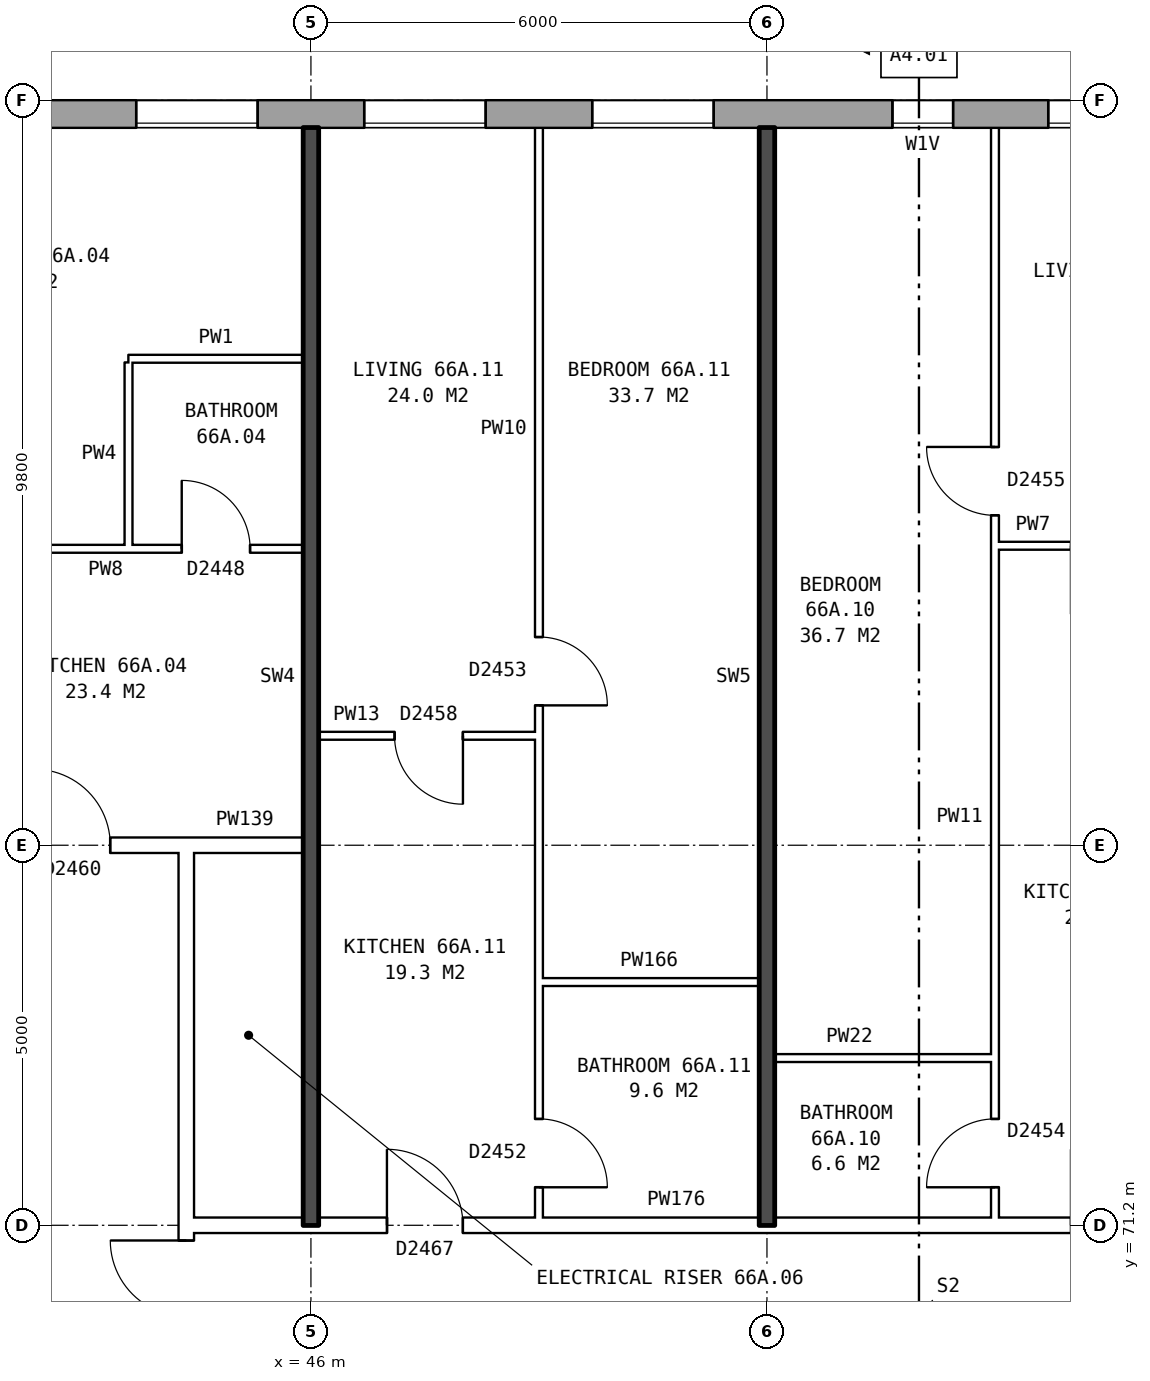
"""IFC4 building model, lengths in metres.
Left out: names, types, materials, properties, quantities, classifications, styles, units other than length and angle.
Written with IfcOpenShell. Run it as: python <this file> out.ifc"""

import sys

from ifc_helpers import new_model, si_unit, direction, frame, frame_2d, origin, place, context, subcontext, project, spatial, rectangle, extrude, element, fill, save


model = new_model("IFC4")
c1 = context("Model", 3, precision=1e-05, world=origin(), true_north=direction((0.0, 1.0)))
c2 = subcontext(c1, "Body", "Model", "MODEL_VIEW")
j1 = project(units=[si_unit("LENGTHUNIT", "METRE"), si_unit("PLANEANGLEUNIT", "RADIAN")], contexts=[c1])
p1 = place(None, origin())
s1 = spatial("IfcSite", under=j1, at=p1, CompositionType="ELEMENT")
p2 = place(p1, origin())
s2 = spatial("IfcBuilding", under=s1, at=p2, CompositionType="ELEMENT")
p3 = place(p2, frame((0.0, 0.0, 233.8)))
s3 = spatial("IfcBuildingStorey", under=s2, at=p3, CompositionType="ELEMENT", Elevation=233.8)
p4 = place(p3, frame((74.95, 85.82, 0.0), z_axis=(0.0, 0.0, 1.0), x_axis=(-1.0, 0.0, 0.0)))
e1 = element("IfcWall", 1, at=p4, inside=s3, PredefinedType="STANDARD", context=c2, shape_type="SweptSolid", body=[
    extrude(rectangle(XDim=39.875, YDim=0.36, at=frame_2d((19.938, 0.0))), origin(), (0.0, 0.0, 1.0), 2.85),
])
p5 = place(p4, frame((2.65, 0.0, 0.8)))
e2 = element("IfcOpeningElement", 2, at=p5, cuts=e1, PredefinedType="OPENING", context=c2, shape_type="SweptSolid", body=[
    extrude(rectangle(XDim=1.6, YDim=1.8, at=frame_2d((0.8, 0.9))), frame((0.0, 0.19, 0.0), z_axis=(0.0, -1.0, 0.0), x_axis=(1.0, 0.0, 0.0)), (0.0, 0.0, 1.0), 0.38),
])
p6 = place(p4, frame((5.65, 0.0, 0.8)))
e3 = element("IfcOpeningElement", 3, at=p6, cuts=e1, PredefinedType="OPENING", context=c2, shape_type="SweptSolid", body=[
    extrude(rectangle(XDim=1.6, YDim=1.8, at=frame_2d((0.8, 0.9))), frame((0.0, 0.19, 0.0), z_axis=(0.0, -1.0, 0.0), x_axis=(1.0, 0.0, 0.0)), (0.0, 0.0, 1.0), 0.38),
])
p7 = place(p4, frame((8.65, 0.0, 0.8)))
e4 = element("IfcOpeningElement", 4, at=p7, cuts=e1, PredefinedType="OPENING", context=c2, shape_type="SweptSolid", body=[
    extrude(rectangle(XDim=1.6, YDim=1.8, at=frame_2d((0.8, 0.9))), frame((0.0, 0.19, 0.0), z_axis=(0.0, -1.0, 0.0), x_axis=(1.0, 0.0, 0.0)), (0.0, 0.0, 1.0), 0.38),
])
p8 = place(p4, frame((11.65, 0.0, 0.8)))
e5 = element("IfcOpeningElement", 5, at=p8, cuts=e1, PredefinedType="OPENING", context=c2, shape_type="SweptSolid", body=[
    extrude(rectangle(XDim=1.6, YDim=1.8, at=frame_2d((0.8, 0.9))), frame((0.0, 0.19, 0.0), z_axis=(0.0, -1.0, 0.0), x_axis=(1.0, 0.0, 0.0)), (0.0, 0.0, 1.0), 0.38),
])
p9 = place(p4, frame((14.65, 0.0, 0.8)))
e6 = element("IfcOpeningElement", 6, at=p9, cuts=e1, PredefinedType="OPENING", context=c2, shape_type="SweptSolid", body=[
    extrude(rectangle(XDim=1.6, YDim=1.8, at=frame_2d((0.8, 0.9))), frame((0.0, 0.19, 0.0), z_axis=(0.0, -1.0, 0.0), x_axis=(1.0, 0.0, 0.0)), (0.0, 0.0, 1.0), 0.38),
])
p10 = place(p4, frame((17.65, 0.0, 0.8)))
e7 = element("IfcOpeningElement", 7, at=p10, cuts=e1, PredefinedType="OPENING", context=c2, shape_type="SweptSolid", body=[
    extrude(rectangle(XDim=1.6, YDim=1.8, at=frame_2d((0.8, 0.9))), frame((0.0, 0.19, 0.0), z_axis=(0.0, -1.0, 0.0), x_axis=(1.0, 0.0, 0.0)), (0.0, 0.0, 1.0), 0.38),
])
p11 = place(p4, frame((20.5, 0.0, 0.15)))
e8 = element("IfcOpeningElement", 8, at=p11, cuts=e1, PredefinedType="OPENING", context=c2, shape_type="SweptSolid", body=[
    extrude(rectangle(XDim=0.8, YDim=0.9, at=frame_2d((0.4, 0.45))), frame((0.0, 0.19, 0.0), z_axis=(0.0, -1.0, 0.0), x_axis=(1.0, 0.0, 0.0)), (0.0, 0.0, 1.0), 0.38),
])
p12 = place(p4, frame((23.65, 0.0, 0.8)))
e9 = element("IfcOpeningElement", 9, at=p12, cuts=e1, PredefinedType="OPENING", context=c2, shape_type="SweptSolid", body=[
    extrude(rectangle(XDim=1.6, YDim=1.8, at=frame_2d((0.8, 0.9))), frame((0.0, 0.19, 0.0), z_axis=(0.0, -1.0, 0.0), x_axis=(1.0, 0.0, 0.0)), (0.0, 0.0, 1.0), 0.38),
])
p13 = place(p4, frame((26.65, 0.0, 0.8)))
e10 = element("IfcOpeningElement", 10, at=p13, cuts=e1, PredefinedType="OPENING", context=c2, shape_type="SweptSolid", body=[
    extrude(rectangle(XDim=1.6, YDim=1.8, at=frame_2d((0.8, 0.9))), frame((0.0, 0.19, 0.0), z_axis=(0.0, -1.0, 0.0), x_axis=(1.0, 0.0, 0.0)), (0.0, 0.0, 1.0), 0.38),
])
p14 = place(p4, frame((29.65, 0.0, 0.8)))
e11 = element("IfcOpeningElement", 11, at=p14, cuts=e1, PredefinedType="OPENING", context=c2, shape_type="SweptSolid", body=[
    extrude(rectangle(XDim=1.6, YDim=1.8, at=frame_2d((0.8, 0.9))), frame((0.0, 0.19, 0.0), z_axis=(0.0, -1.0, 0.0), x_axis=(1.0, 0.0, 0.0)), (0.0, 0.0, 1.0), 0.38),
])
p15 = place(p4, frame((32.65, 0.0, 0.8)))
e12 = element("IfcOpeningElement", 12, at=p15, cuts=e1, PredefinedType="OPENING", context=c2, shape_type="SweptSolid", body=[
    extrude(rectangle(XDim=1.6, YDim=1.8, at=frame_2d((0.8, 0.9))), frame((0.0, 0.19, 0.0), z_axis=(0.0, -1.0, 0.0), x_axis=(1.0, 0.0, 0.0)), (0.0, 0.0, 1.0), 0.38),
])
p16 = place(p4, frame((35.65, 0.0, 0.8)))
e13 = element("IfcOpeningElement", 13, at=p16, cuts=e1, PredefinedType="OPENING", context=c2, shape_type="SweptSolid", body=[
    extrude(rectangle(XDim=1.6, YDim=1.8, at=frame_2d((0.8, 0.9))), frame((0.0, 0.19, 0.0), z_axis=(0.0, -1.0, 0.0), x_axis=(1.0, 0.0, 0.0)), (0.0, 0.0, 1.0), 0.38),
])
p17 = place(p3, frame((44.36, 63.9, 0.0), z_axis=(0.0, 0.0, 1.0), x_axis=(0.0, 1.0, 0.0)))
e14 = element("IfcWall", 14, at=p17, inside=s3, PredefinedType="PARTITIONING", context=c2, shape_type="SweptSolid", body=[
    extrude(rectangle(XDim=12.2, YDim=0.2, at=frame_2d((6.1, 0.0))), origin(), (0.0, 0.0, 1.0), 2.85),
])
p18 = place(p17, frame((5.1, 0.0, 0.0)))
e15 = element("IfcOpeningElement", 15, at=p18, cuts=e14, PredefinedType="OPENING", context=c2, shape_type="SweptSolid", body=[
    extrude(rectangle(XDim=2.0, YDim=2.1, at=frame_2d((1.0, 1.05))), frame((0.0, 0.11, 0.0), z_axis=(0.0, -1.0, 0.0), x_axis=(1.0, 0.0, 0.0)), (0.0, 0.0, 1.0), 0.22),
])
p19 = place(p3, frame((44.36, 71.2, 0.0), z_axis=(0.0, 0.0, 1.0), x_axis=(1.0, 0.0, 0.0)))
e16 = element("IfcWall", 16, at=p19, inside=s3, PredefinedType="PARTITIONING", context=c2, shape_type="SweptSolid", body=[
    extrude(rectangle(XDim=19.28, YDim=0.2, at=frame_2d((9.64, 0.0))), origin(), (0.0, 0.0, 1.0), 2.85),
])
p20 = place(p19, frame((14.64, 0.0, 0.0)))
e17 = element("IfcOpeningElement", 17, at=p20, cuts=e16, PredefinedType="OPENING", context=c2, shape_type="SweptSolid", body=[
    extrude(rectangle(XDim=1.0, YDim=2.1, at=frame_2d((0.5, 1.05))), frame((0.0, 0.11, 0.0), z_axis=(0.0, -1.0, 0.0), x_axis=(1.0, 0.0, 0.0)), (0.0, 0.0, 1.0), 0.22),
])
p21 = place(p19, frame((11.64, 0.0, 0.0)))
e18 = element("IfcOpeningElement", 18, at=p21, cuts=e16, PredefinedType="OPENING", context=c2, shape_type="SweptSolid", body=[
    extrude(rectangle(XDim=1.0, YDim=2.1, at=frame_2d((0.5, 1.05))), frame((0.0, 0.11, 0.0), z_axis=(0.0, -1.0, 0.0), x_axis=(1.0, 0.0, 0.0)), (0.0, 0.0, 1.0), 0.22),
])
p22 = place(p19, frame((2.64, 0.0, 0.0)))
e19 = element("IfcOpeningElement", 19, at=p22, cuts=e16, PredefinedType="OPENING", context=c2, shape_type="SweptSolid", body=[
    extrude(rectangle(XDim=1.0, YDim=2.1, at=frame_2d((0.5, 1.05))), frame((0.0, 0.11, 0.0), z_axis=(0.0, -1.0, 0.0), x_axis=(1.0, 0.0, 0.0)), (0.0, 0.0, 1.0), 0.22),
])
for number, where, z_axis, x_axis in (
    (20, (52.1, 73.4, 0.0), (0.0, 0.0, 1.0), (1.0, 0.0, 0.0)),
    (21, (49.0, 74.4, 0.0), (0.0, 0.0, 1.0), (1.0, 0.0, 0.0)),
):
    element("IfcWall", number, at=place(p3, frame(where, z_axis=z_axis, x_axis=x_axis)), inside=s3, PredefinedType="PARTITIONING", context=c2, shape_type="SweptSolid", body=[
        extrude(rectangle(XDim=2.9, YDim=0.1, at=frame_2d((1.45, 0.0))), origin(), (0.0, 0.0, 1.0), 2.85),
    ])
p23 = place(p3, frame((41.36, 76.2, 0.0), z_axis=(0.0, 0.0, 1.0), x_axis=(1.0, 0.0, 0.0)))
e22 = element("IfcWall", 22, at=p23, inside=s3, PredefinedType="PARTITIONING", context=c2, shape_type="SweptSolid", body=[
    extrude(rectangle(XDim=3.0, YDim=0.2, at=frame_2d((1.5, 0.0))), origin(), (0.0, 0.0, 1.0), 2.85),
])
p24 = place(p23, frame((1.0, 0.0, 0.0)))
e23 = element("IfcOpeningElement", 23, at=p24, cuts=e22, PredefinedType="OPENING", context=c2, shape_type="SweptSolid", body=[
    extrude(rectangle(XDim=1.0, YDim=2.1, at=frame_2d((0.5, 1.05))), frame((0.0, 0.11, 0.0), z_axis=(0.0, -1.0, 0.0), x_axis=(1.0, 0.0, 0.0)), (0.0, 0.0, 1.0), 0.22),
])
p25 = place(p3, frame((44.36, 76.2, 0.0), z_axis=(0.0, 0.0, 1.0), x_axis=(1.0, 0.0, 0.0)))
e24 = element("IfcWall", 24, at=p25, inside=s3, PredefinedType="PARTITIONING", context=c2, shape_type="SweptSolid", body=[
    extrude(rectangle(XDim=1.54, YDim=0.2, at=frame_2d((0.77, 0.0))), origin(), (0.0, 0.0, 1.0), 2.85),
])
p26 = place(p3, frame((46.1, 77.64, 0.0), z_axis=(0.0, 0.0, 1.0), x_axis=(1.0, 0.0, 0.0)))
e25 = element("IfcWall", 25, at=p26, inside=s3, PredefinedType="PARTITIONING", context=c2, shape_type="SweptSolid", body=[
    extrude(rectangle(XDim=2.9, YDim=0.1, at=frame_2d((1.45, 0.0))), origin(), (0.0, 0.0, 1.0), 2.85),
])
p27 = place(p26, frame((1.0, 0.0, 0.0)))
e26 = element("IfcOpeningElement", 26, at=p27, cuts=e25, PredefinedType="OPENING", context=c2, shape_type="SweptSolid", body=[
    extrude(rectangle(XDim=0.9, YDim=2.1, at=frame_2d((0.45, 1.05))), frame((0.0, 0.06, 0.0), z_axis=(0.0, -1.0, 0.0), x_axis=(1.0, 0.0, 0.0)), (0.0, 0.0, 1.0), 0.12),
])
p28 = place(p3, frame((40.1, 80.1, 0.0), z_axis=(0.0, 0.0, 1.0), x_axis=(1.0, 0.0, 0.0)))
e27 = element("IfcWall", 27, at=p28, inside=s3, PredefinedType="PARTITIONING", context=c2, shape_type="SweptSolid", body=[
    extrude(rectangle(XDim=5.8, YDim=0.1, at=frame_2d((2.9, 0.0))), origin(), (0.0, 0.0, 1.0), 2.85),
])
p29 = place(p28, frame((1.3, 0.0, 0.0)))
e28 = element("IfcOpeningElement", 28, at=p29, cuts=e27, PredefinedType="OPENING", context=c2, shape_type="SweptSolid", body=[
    extrude(rectangle(XDim=0.9, YDim=2.1, at=frame_2d((0.45, 1.05))), frame((0.0, 0.06, 0.0), z_axis=(0.0, -1.0, 0.0), x_axis=(1.0, 0.0, 0.0)), (0.0, 0.0, 1.0), 0.12),
])
p30 = place(p28, frame((4.2, 0.0, 0.0)))
e29 = element("IfcOpeningElement", 29, at=p30, cuts=e27, PredefinedType="OPENING", context=c2, shape_type="SweptSolid", body=[
    extrude(rectangle(XDim=0.9, YDim=2.1, at=frame_2d((0.45, 1.05))), frame((0.0, 0.06, 0.0), z_axis=(0.0, -1.0, 0.0), x_axis=(1.0, 0.0, 0.0)), (0.0, 0.0, 1.0), 0.12),
])
p31 = place(p3, frame((55.0, 80.14, 0.0), z_axis=(0.0, 0.0, 1.0), x_axis=(1.0, 0.0, 0.0)))
e30 = element("IfcWall", 30, at=p31, inside=s3, PredefinedType="PARTITIONING", context=c2, shape_type="SweptSolid", body=[
    extrude(rectangle(XDim=2.9, YDim=0.1, at=frame_2d((1.45, 0.0))), origin(), (0.0, 0.0, 1.0), 2.85),
])
p32 = place(p31, frame((1.0, 0.0, 0.0)))
e31 = element("IfcOpeningElement", 31, at=p32, cuts=e30, PredefinedType="OPENING", context=c2, shape_type="SweptSolid", body=[
    extrude(rectangle(XDim=0.9, YDim=2.1, at=frame_2d((0.45, 1.05))), frame((0.0, 0.06, 0.0), z_axis=(0.0, -1.0, 0.0), x_axis=(1.0, 0.0, 0.0)), (0.0, 0.0, 1.0), 0.12),
])
p33 = place(p3, frame((43.6, 82.6, 0.0), z_axis=(0.0, 0.0, 1.0), x_axis=(1.0, 0.0, 0.0)))
e32 = element("IfcWall", 32, at=p33, inside=s3, PredefinedType="PARTITIONING", context=c2, shape_type="SweptSolid", body=[
    extrude(rectangle(XDim=2.3, YDim=0.1, at=frame_2d((1.15, 0.0))), origin(), (0.0, 0.0, 1.0), 2.85),
])
p34 = place(p3, frame((43.6, 80.15, 0.0), z_axis=(0.0, 0.0, 1.0), x_axis=(0.0, 1.0, 0.0)))
e33 = element("IfcWall", 33, at=p34, inside=s3, PredefinedType="PARTITIONING", context=c2, shape_type="SweptSolid", body=[
    extrude(rectangle(XDim=2.4, YDim=0.1, at=frame_2d((1.2, 0.0))), origin(), (0.0, 0.0, 1.0), 2.85),
])
p35 = place(p3, frame((46.0, 71.2, 0.0), z_axis=(0.0, 0.0, 1.0), x_axis=(0.0, 1.0, 0.0)))
e34 = element("IfcWall", 34, at=p35, inside=s3, PredefinedType="SOLIDWALL", context=c2, shape_type="SweptSolid", body=[
    extrude(rectangle(XDim=14.44, YDim=0.2, at=frame_2d((7.22, 0.0))), origin(), (0.0, 0.0, 1.0), 2.85),
])
p36 = place(p3, frame((49.0, 71.3, 0.0), z_axis=(0.0, 0.0, 1.0), x_axis=(0.0, 1.0, 0.0)))
e35 = element("IfcWall", 35, at=p36, inside=s3, PredefinedType="PARTITIONING", context=c2, shape_type="SweptSolid", body=[
    extrude(rectangle(XDim=14.34, YDim=0.1, at=frame_2d((7.17, 0.0))), origin(), (0.0, 0.0, 1.0), 2.85),
])
p37 = place(p36, frame((6.74, 0.0, 0.0)))
e36 = element("IfcOpeningElement", 36, at=p37, cuts=e35, PredefinedType="OPENING", context=c2, shape_type="SweptSolid", body=[
    extrude(rectangle(XDim=0.9, YDim=2.1, at=frame_2d((0.45, 1.05))), frame((0.0, 0.06, 0.0), z_axis=(0.0, -1.0, 0.0), x_axis=(1.0, 0.0, 0.0)), (0.0, 0.0, 1.0), 0.12),
])
p38 = place(p36, frame((0.4, 0.0, 0.0)))
e37 = element("IfcOpeningElement", 37, at=p38, cuts=e35, PredefinedType="OPENING", context=c2, shape_type="SweptSolid", body=[
    extrude(rectangle(XDim=0.9, YDim=2.1, at=frame_2d((0.45, 1.05))), frame((0.0, 0.06, 0.0), z_axis=(0.0, -1.0, 0.0), x_axis=(1.0, 0.0, 0.0)), (0.0, 0.0, 1.0), 0.12),
])
p39 = place(p3, frame((52.0, 71.2, 0.0), z_axis=(0.0, 0.0, 1.0), x_axis=(0.0, 1.0, 0.0)))
e38 = element("IfcWall", 38, at=p39, inside=s3, PredefinedType="SOLIDWALL", context=c2, shape_type="SweptSolid", body=[
    extrude(rectangle(XDim=14.44, YDim=0.2, at=frame_2d((7.22, 0.0))), origin(), (0.0, 0.0, 1.0), 2.85),
])
p40 = place(p3, frame((55.0, 71.3, 0.0), z_axis=(0.0, 0.0, 1.0), x_axis=(0.0, 1.0, 0.0)))
e39 = element("IfcWall", 39, at=p40, inside=s3, PredefinedType="PARTITIONING", context=c2, shape_type="SweptSolid", body=[
    extrude(rectangle(XDim=14.34, YDim=0.1, at=frame_2d((7.17, 0.0))), origin(), (0.0, 0.0, 1.0), 2.85),
])
p41 = place(p40, frame((9.24, 0.0, 0.0)))
e40 = element("IfcOpeningElement", 40, at=p41, cuts=e39, PredefinedType="OPENING", context=c2, shape_type="SweptSolid", body=[
    extrude(rectangle(XDim=0.9, YDim=2.1, at=frame_2d((0.45, 1.05))), frame((0.0, 0.06, 0.0), z_axis=(0.0, -1.0, 0.0), x_axis=(1.0, 0.0, 0.0)), (0.0, 0.0, 1.0), 0.12),
])
p42 = place(p40, frame((0.4, 0.0, 0.0)))
e41 = element("IfcOpeningElement", 41, at=p42, cuts=e39, PredefinedType="OPENING", context=c2, shape_type="SweptSolid", body=[
    extrude(rectangle(XDim=0.9, YDim=2.1, at=frame_2d((0.45, 1.05))), frame((0.0, 0.06, 0.0), z_axis=(0.0, -1.0, 0.0), x_axis=(1.0, 0.0, 0.0)), (0.0, 0.0, 1.0), 0.12),
])
p43 = place(p10, origin())
e42 = element("IfcWindow", 42, at=p43, inside=s3, PartitioningType="SINGLE_PANEL", PredefinedType="WINDOW", context=c2, shape_type="SweptSolid", body=[
    extrude(rectangle(XDim=1.6, YDim=1.8, at=frame_2d((0.8, 0.9))), frame((0.0, 0.15, 0.0), z_axis=(0.0, -1.0, 0.0), x_axis=(1.0, 0.0, 0.0)), (0.0, 0.0, 1.0), 0.06),
])
fill(e7, e42)
p44 = place(p11, origin())
e43 = element("IfcWindow", 43, at=p44, inside=s3, PartitioningType="SINGLE_PANEL", PredefinedType="WINDOW", context=c2, shape_type="SweptSolid", body=[
    extrude(rectangle(XDim=0.8, YDim=0.9, at=frame_2d((0.4, 0.45))), frame((0.0, 0.15, 0.0), z_axis=(0.0, -1.0, 0.0), x_axis=(1.0, 0.0, 0.0)), (0.0, 0.0, 1.0), 0.06),
])
fill(e8, e43)
p45 = place(p12, origin())
e44 = element("IfcWindow", 44, at=p45, inside=s3, PartitioningType="SINGLE_PANEL", PredefinedType="WINDOW", context=c2, shape_type="SweptSolid", body=[
    extrude(rectangle(XDim=1.6, YDim=1.8, at=frame_2d((0.8, 0.9))), frame((0.0, 0.15, 0.0), z_axis=(0.0, -1.0, 0.0), x_axis=(1.0, 0.0, 0.0)), (0.0, 0.0, 1.0), 0.06),
])
fill(e9, e44)
p46 = place(p13, origin())
e45 = element("IfcWindow", 45, at=p46, inside=s3, PartitioningType="SINGLE_PANEL", PredefinedType="WINDOW", context=c2, shape_type="SweptSolid", body=[
    extrude(rectangle(XDim=1.6, YDim=1.8, at=frame_2d((0.8, 0.9))), frame((0.0, 0.15, 0.0), z_axis=(0.0, -1.0, 0.0), x_axis=(1.0, 0.0, 0.0)), (0.0, 0.0, 1.0), 0.06),
])
fill(e10, e45)
p47 = place(p14, origin())
e46 = element("IfcWindow", 46, at=p47, inside=s3, PartitioningType="SINGLE_PANEL", PredefinedType="WINDOW", context=c2, shape_type="SweptSolid", body=[
    extrude(rectangle(XDim=1.6, YDim=1.8, at=frame_2d((0.8, 0.9))), frame((0.0, 0.15, 0.0), z_axis=(0.0, -1.0, 0.0), x_axis=(1.0, 0.0, 0.0)), (0.0, 0.0, 1.0), 0.06),
])
fill(e11, e46)
p48 = place(p18, origin())
e47 = element("IfcDoor", 47, at=p48, inside=s3, OperationType="DOUBLE_DOOR_SINGLE_SWING", PredefinedType="DOOR", context=c2, shape_type="SweptSolid", body=[
    extrude(rectangle(XDim=2.0, YDim=2.1, at=frame_2d((1.0, 1.05))), frame((0.0, 0.025, 0.0), z_axis=(0.0, -1.0, 0.0), x_axis=(1.0, 0.0, 0.0)), (0.0, 0.0, 1.0), 0.05),
])
fill(e15, e47)
p49 = place(p24, origin())
e48 = element("IfcDoor", 48, at=p49, inside=s3, OperationType="SINGLE_SWING_LEFT", PredefinedType="DOOR", context=c2, shape_type="SweptSolid", body=[
    extrude(rectangle(XDim=1.0, YDim=2.1, at=frame_2d((0.5, 1.05))), frame((0.0, 0.025, 0.0), z_axis=(0.0, -1.0, 0.0), x_axis=(1.0, 0.0, 0.0)), (0.0, 0.0, 1.0), 0.05),
])
fill(e23, e48)
p50 = place(p30, origin())
e49 = element("IfcDoor", 49, at=p50, inside=s3, OperationType="SINGLE_SWING_LEFT", PredefinedType="DOOR", context=c2, shape_type="SweptSolid", body=[
    extrude(rectangle(XDim=0.9, YDim=2.1, at=frame_2d((0.45, 1.05))), frame((0.0, 0.025, 0.0), z_axis=(0.0, -1.0, 0.0), x_axis=(1.0, 0.0, 0.0)), (0.0, 0.0, 1.0), 0.05),
])
fill(e29, e49)
p51 = place(p41, origin())
e50 = element("IfcDoor", 50, at=p51, inside=s3, OperationType="SINGLE_SWING_RIGHT", PredefinedType="DOOR", context=c2, shape_type="SweptSolid", body=[
    extrude(rectangle(XDim=0.9, YDim=2.1, at=frame_2d((0.45, 1.05))), frame((0.0, 0.025, 0.0), z_axis=(0.0, -1.0, 0.0), x_axis=(1.0, 0.0, 0.0)), (0.0, 0.0, 1.0), 0.05),
])
fill(e40, e50)
p52 = place(p42, origin())
e51 = element("IfcDoor", 51, at=p52, inside=s3, OperationType="SINGLE_SWING_LEFT", PredefinedType="DOOR", context=c2, shape_type="SweptSolid", body=[
    extrude(rectangle(XDim=0.9, YDim=2.1, at=frame_2d((0.45, 1.05))), frame((0.0, 0.025, 0.0), z_axis=(0.0, -1.0, 0.0), x_axis=(1.0, 0.0, 0.0)), (0.0, 0.0, 1.0), 0.05),
])
fill(e41, e51)
p53 = place(p37, frame((0.9, 0.0, 0.0), z_axis=(0.0, 0.0, 1.0), x_axis=(-1.0, 0.0, 0.0)))
e52 = element("IfcDoor", 52, at=p53, inside=s3, OperationType="SINGLE_SWING_RIGHT", PredefinedType="DOOR", context=c2, shape_type="SweptSolid", body=[
    extrude(rectangle(XDim=0.9, YDim=2.1, at=frame_2d((0.45, 1.05))), frame((0.0, 0.025, 0.0), z_axis=(0.0, -1.0, 0.0), x_axis=(1.0, 0.0, 0.0)), (0.0, 0.0, 1.0), 0.05),
])
fill(e36, e52)
p54 = place(p22, origin())
e53 = element("IfcDoor", 53, at=p54, inside=s3, OperationType="SINGLE_SWING_LEFT", PredefinedType="DOOR", context=c2, shape_type="SweptSolid", body=[
    extrude(rectangle(XDim=1.0, YDim=2.1, at=frame_2d((0.5, 1.05))), frame((0.0, 0.025, 0.0), z_axis=(0.0, -1.0, 0.0), x_axis=(1.0, 0.0, 0.0)), (0.0, 0.0, 1.0), 0.05),
])
fill(e19, e53)
p55 = place(p27, frame((0.9, 0.0, 0.0), z_axis=(0.0, 0.0, 1.0), x_axis=(-1.0, 0.0, 0.0)))
e54 = element("IfcDoor", 54, at=p55, inside=s3, OperationType="SINGLE_SWING_LEFT", PredefinedType="DOOR", context=c2, shape_type="SweptSolid", body=[
    extrude(rectangle(XDim=0.9, YDim=2.1, at=frame_2d((0.45, 1.05))), frame((0.0, 0.025, 0.0), z_axis=(0.0, -1.0, 0.0), x_axis=(1.0, 0.0, 0.0)), (0.0, 0.0, 1.0), 0.05),
])
fill(e26, e54)
p56 = place(p38, frame((0.9, 0.0, 0.0), z_axis=(0.0, 0.0, 1.0), x_axis=(-1.0, 0.0, 0.0)))
e55 = element("IfcDoor", 55, at=p56, inside=s3, OperationType="SINGLE_SWING_RIGHT", PredefinedType="DOOR", context=c2, shape_type="SweptSolid", body=[
    extrude(rectangle(XDim=0.9, YDim=2.1, at=frame_2d((0.45, 1.05))), frame((0.0, 0.025, 0.0), z_axis=(0.0, -1.0, 0.0), x_axis=(1.0, 0.0, 0.0)), (0.0, 0.0, 1.0), 0.05),
])
fill(e37, e55)
save(model, sys.argv[1])
